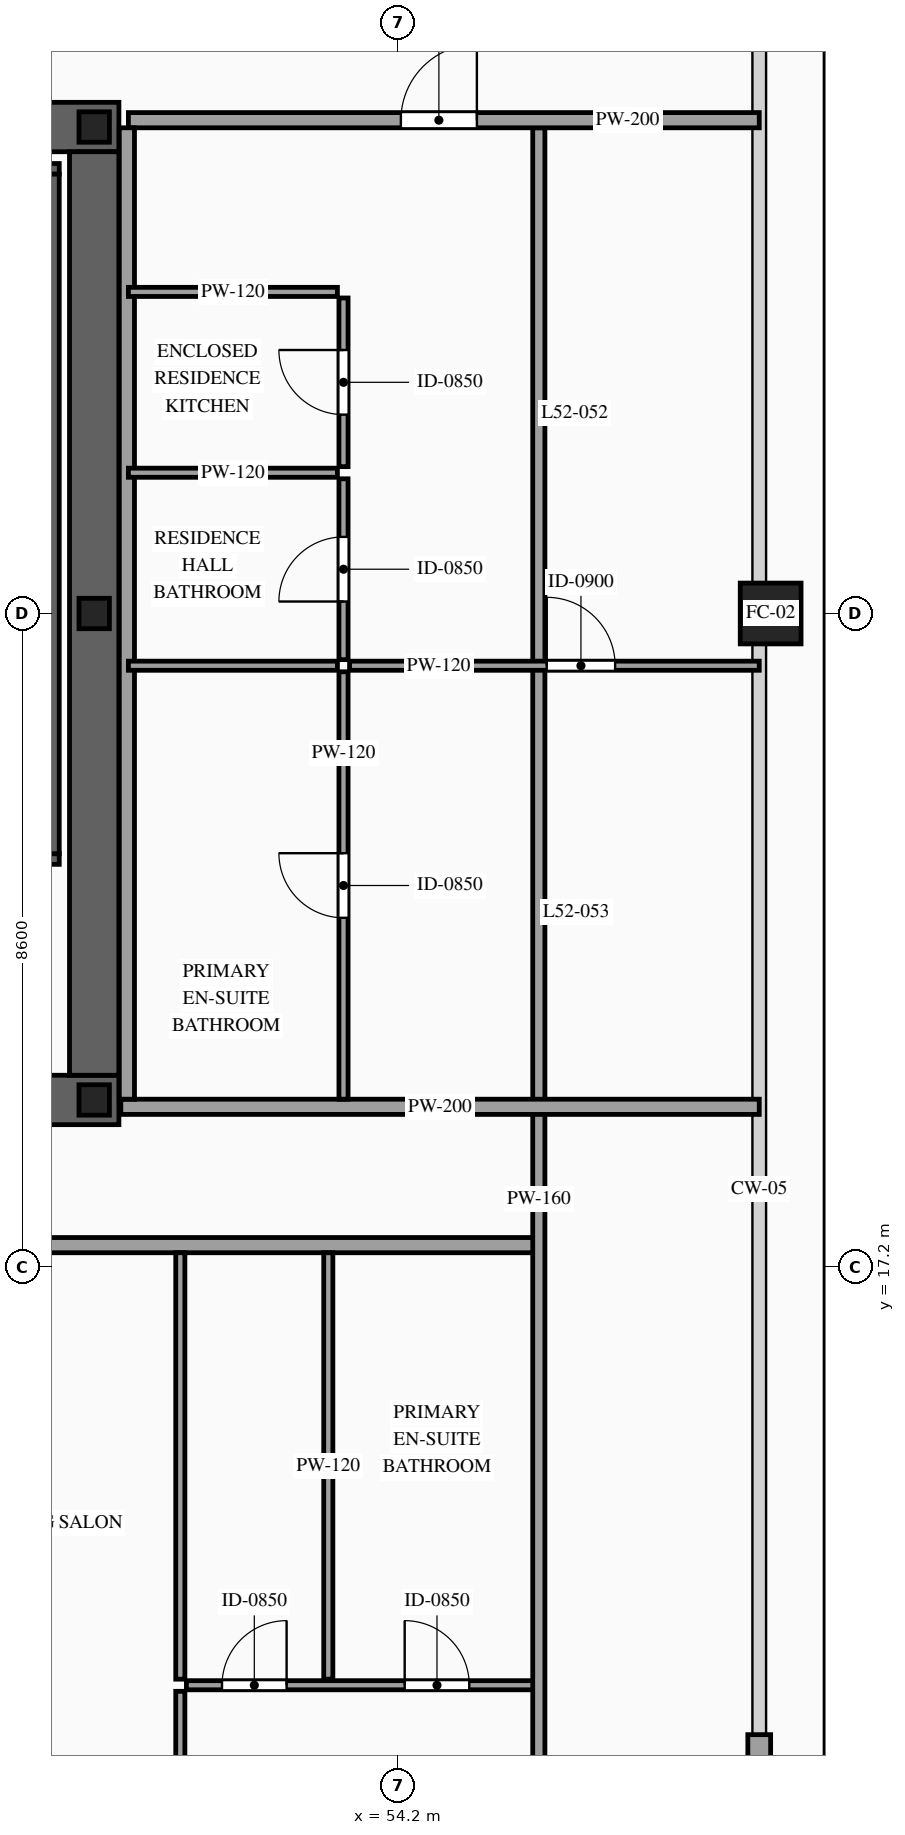
"""IFC4 building model, lengths in metres.
Left out: names, types, materials, properties, quantities, classifications, styles, units other than length and angle.
Written with IfcOpenShell. Run it as: python <this file> out.ifc"""

import sys

from ifc_helpers import new_model, si_unit, direction, frame, frame_2d, origin, origin_2d, place, context, subcontext, project, spatial, rectangle, hollow_rectangle, i_section, extrude, source, transform, mapped, element, fill, save


model = new_model("IFC4")
c1 = context("Model", 3, precision=1e-05, world=origin(), true_north=direction((0.0, 1.0)))
c2 = subcontext(c1, "Body", "Model", "MODEL_VIEW")
j1 = project(units=[si_unit("LENGTHUNIT", "METRE"), si_unit("PLANEANGLEUNIT", "RADIAN")], contexts=[c1])
p1 = place(None, origin())
s1 = spatial("IfcSite", under=j1, at=p1, CompositionType="ELEMENT")
p2 = place(p1, origin())
s2 = spatial("IfcBuilding", under=s1, at=p2, CompositionType="ELEMENT")
p3 = place(p2, frame((0.0, 0.0, 198.5)))
s3 = spatial("IfcBuildingStorey", under=s2, at=p3, CompositionType="ELEMENT", Elevation=198.5)
p4 = place(p3, frame((23.475, 19.4, 0.0), z_axis=(0.0, 0.0, 1.0), x_axis=(1.0, 0.0, 0.0)))
e1 = element("IfcWall", 1, at=p4, inside=s3, PredefinedType="SHEAR", context=c2, shape_type="SweptSolid", body=[
    extrude(rectangle(XDim=27.05, YDim=0.65, at=frame_2d((13.525, 0.0))), origin(), (0.0, 0.0, 1.0), 3.5),
])
p5 = place(p4, frame((1.975, 0.0, 0.0)))
e2 = element("IfcOpeningElement", 2, at=p5, cuts=e1, PredefinedType="OPENING", context=c2, shape_type="SweptSolid", body=[
    extrude(rectangle(XDim=1.1, YDim=2.2, at=frame_2d((0.55, 1.1))), frame((0.0, 0.34, 0.0), z_axis=(0.0, -1.0, 0.0), x_axis=(1.0, 0.0, 0.0)), (0.0, 0.0, 1.0), 0.68),
])
p6 = place(p4, frame((9.875, 0.0, 0.0)))
e3 = element("IfcOpeningElement", 3, at=p6, cuts=e1, PredefinedType="OPENING", context=c2, shape_type="SweptSolid", body=[
    extrude(rectangle(XDim=1.1, YDim=2.2, at=frame_2d((0.55, 1.1))), frame((0.0, 0.34, 0.0), z_axis=(0.0, -1.0, 0.0), x_axis=(1.0, 0.0, 0.0)), (0.0, 0.0, 1.0), 0.68),
])
p7 = place(p4, frame((23.075, 0.0, 0.0)))
e4 = element("IfcOpeningElement", 4, at=p7, cuts=e1, PredefinedType="OPENING", context=c2, shape_type="SweptSolid", body=[
    extrude(rectangle(XDim=1.1, YDim=2.2, at=frame_2d((0.55, 1.1))), frame((0.0, 0.34, 0.0), z_axis=(0.0, -1.0, 0.0), x_axis=(1.0, 0.0, 0.0)), (0.0, 0.0, 1.0), 0.68),
])
p8 = place(p4, frame((19.695, 0.0, 0.0)))
e5 = element("IfcOpeningElement", 5, at=p8, cuts=e1, PredefinedType="OPENING", context=c2, shape_type="SweptSolid", body=[
    extrude(rectangle(XDim=0.9, YDim=2.15, at=frame_2d((0.45, 1.075))), frame((0.0, 0.34, 0.0), z_axis=(0.0, -1.0, 0.0), x_axis=(1.0, 0.0, 0.0)), (0.0, 0.0, 1.0), 0.68),
])
p9 = place(p4, frame((18.255, 0.0, 0.0)))
e6 = element("IfcOpeningElement", 6, at=p9, cuts=e1, PredefinedType="OPENING", context=c2, shape_type="SweptSolid", body=[
    extrude(rectangle(XDim=0.9, YDim=2.15, at=frame_2d((0.45, 1.075))), frame((0.0, 0.34, 0.0), z_axis=(0.0, -1.0, 0.0), x_axis=(1.0, 0.0, 0.0)), (0.0, 0.0, 1.0), 0.68),
])
p10 = place(p3, frame((23.475, 32.2, 0.0), z_axis=(0.0, 0.0, 1.0), x_axis=(1.0, 0.0, 0.0)))
e7 = element("IfcWall", 7, at=p10, inside=s3, PredefinedType="SHEAR", context=c2, shape_type="SweptSolid", body=[
    extrude(rectangle(XDim=27.05, YDim=0.65, at=frame_2d((13.525, 0.0))), origin(), (0.0, 0.0, 1.0), 3.5),
])
p11 = place(p10, frame((4.595, 0.0, 0.0)))
e8 = element("IfcOpeningElement", 8, at=p11, cuts=e7, PredefinedType="OPENING", context=c2, shape_type="SweptSolid", body=[
    extrude(rectangle(XDim=0.9, YDim=2.15, at=frame_2d((0.45, 1.075))), frame((0.0, 0.34, 0.0), z_axis=(0.0, -1.0, 0.0), x_axis=(1.0, 0.0, 0.0)), (0.0, 0.0, 1.0), 0.68),
])
p12 = place(p10, frame((9.875, 0.0, 0.0)))
e9 = element("IfcOpeningElement", 9, at=p12, cuts=e7, PredefinedType="OPENING", context=c2, shape_type="SweptSolid", body=[
    extrude(rectangle(XDim=1.1, YDim=2.2, at=frame_2d((0.55, 1.1))), frame((0.0, 0.34, 0.0), z_axis=(0.0, -1.0, 0.0), x_axis=(1.0, 0.0, 0.0)), (0.0, 0.0, 1.0), 0.68),
])
p13 = place(p10, frame((15.725, 0.0, 0.0)))
e10 = element("IfcOpeningElement", 10, at=p13, cuts=e7, PredefinedType="OPENING", context=c2, shape_type="SweptSolid", body=[
    extrude(rectangle(XDim=1.1, YDim=2.2, at=frame_2d((0.55, 1.1))), frame((0.0, 0.34, 0.0), z_axis=(0.0, -1.0, 0.0), x_axis=(1.0, 0.0, 0.0)), (0.0, 0.0, 1.0), 0.68),
])
p14 = place(p10, frame((18.255, 0.0, 0.0)))
e11 = element("IfcOpeningElement", 11, at=p14, cuts=e7, PredefinedType="OPENING", context=c2, shape_type="SweptSolid", body=[
    extrude(rectangle(XDim=0.9, YDim=2.15, at=frame_2d((0.45, 1.075))), frame((0.0, 0.34, 0.0), z_axis=(0.0, -1.0, 0.0), x_axis=(1.0, 0.0, 0.0)), (0.0, 0.0, 1.0), 0.68),
])
p15 = place(p10, frame((19.695, 0.0, 0.0)))
e12 = element("IfcOpeningElement", 12, at=p15, cuts=e7, PredefinedType="OPENING", context=c2, shape_type="SweptSolid", body=[
    extrude(rectangle(XDim=0.9, YDim=2.15, at=frame_2d((0.45, 1.075))), frame((0.0, 0.34, 0.0), z_axis=(0.0, -1.0, 0.0), x_axis=(1.0, 0.0, 0.0)), (0.0, 0.0, 1.0), 0.68),
])
m1 = source(origin(), c2, "Body", "SweptSolid", [
    extrude(rectangle(XDim=12.15, YDim=0.65, at=frame_2d((6.075, 0.0))), origin(), (0.0, 0.0, 1.0), 3.5),
])
p16 = place(p3, frame((50.2, 19.725, 0.0), z_axis=(0.0, 0.0, 1.0), x_axis=(0.0, 1.0, 0.0)))
e13 = element("IfcWall", 13, at=p16, inside=s3, PredefinedType="SHEAR", context=c2, shape_type="MappedRepresentation", body=[
    mapped(m1, transform((0.0, 0.0, 0.0), scale=1.0)),
])
m2 = source(origin(), c2, "Body", "SweptSolid", [
    extrude(i_section(OverallWidth=0.4, OverallDepth=0.4, WebThickness=0.013, FlangeThickness=0.021, at=origin_2d()), origin(), (0.0, 0.0, 1.0), 3.5),
])
for number, where, z_axis, x_axis in (
    (14, (50.2, 19.4, 0.0), (0.0, 0.0, 1.0), (1.0, 0.0, 0.0)),
    (15, (50.2, 25.8, 0.0), (0.0, 0.0, 1.0), (1.0, 0.0, 0.0)),
    (16, (50.2, 32.2, 0.0), (0.0, 0.0, 1.0), (1.0, 0.0, 0.0)),
):
    element("IfcColumn", number, at=place(p3, frame(where, z_axis=z_axis, x_axis=x_axis)), inside=s3, PredefinedType="COLUMN", context=c2, shape_type="MappedRepresentation", body=[
        mapped(m2, transform((0.0, 0.0, 0.0), scale=1.0)),
    ])
m3 = source(origin(), c2, "Body", "SweptSolid", [
    extrude(hollow_rectangle(XDim=0.8, YDim=0.8, WallThickness=0.036, at=origin_2d()), origin(), (0.0, 0.0, 1.0), 3.5),
])
p17 = place(p3, frame((59.1, 25.8, 0.0), z_axis=(0.0, 0.0, 1.0), x_axis=(1.0, 0.0, 0.0)))
e17 = element("IfcColumn", 17, at=p17, inside=s3, PredefinedType="COLUMN", context=c2, shape_type="MappedRepresentation", body=[
    mapped(m3, transform((0.0, 0.0, 0.0), scale=1.0)),
])
m4 = source(origin(), c2, "Body", "SweptSolid", [
    extrude(rectangle(XDim=3.05, YDim=0.3, at=frame_2d((1.525, 0.0))), origin(), (0.0, 0.0, 1.0), 2.835),
])
p18 = place(p3, frame((58.95, 8.0, 0.0), z_axis=(0.0, 0.0, 1.0), x_axis=(0.0, 1.0, 0.0)))
e18 = element("IfcWall", 18, at=p18, inside=s3, PredefinedType="SOLIDWALL", context=c2, shape_type="MappedRepresentation", body=[
    mapped(m4, transform((0.0, 0.0, 0.0), scale=1.0)),
])
p19 = place(p3, frame((46.46, 22.57, 0.0), z_axis=(0.0, 0.0, 1.0), x_axis=(1.0, 0.0, 0.0)))
e19 = element("IfcWall", 19, at=p19, inside=s3, PredefinedType="SOLIDWALL", context=c2, shape_type="SweptSolid", body=[
    extrude(rectangle(XDim=3.28, YDim=0.14, at=frame_2d((1.64, 0.0))), origin(), (0.0, 0.0, 1.0), 3.28),
])
p20 = place(p19, frame((1.09, 0.0, 0.0)))
e20 = element("IfcOpeningElement", 20, at=p20, cuts=e19, PredefinedType="OPENING", context=c2, shape_type="SweptSolid", body=[
    extrude(rectangle(XDim=1.1, YDim=2.2, at=frame_2d((0.55, 1.1))), frame((0.0, 0.085, 0.0), z_axis=(0.0, -1.0, 0.0), x_axis=(1.0, 0.0, 0.0)), (0.0, 0.0, 1.0), 0.17),
])
m5 = source(origin(), c2, "Body", "SweptSolid", [
    extrude(rectangle(XDim=3.28, YDim=0.14, at=frame_2d((1.64, 0.0))), origin(), (0.0, 0.0, 1.0), 3.28),
])
p21 = place(p3, frame((46.46, 31.65, 0.0), z_axis=(0.0, 0.0, 1.0), x_axis=(1.0, 0.0, 0.0)))
e21 = element("IfcWall", 21, at=p21, inside=s3, PredefinedType="SOLIDWALL", context=c2, shape_type="MappedRepresentation", body=[
    mapped(m5, transform((0.0, 0.0, 0.0), scale=1.0)),
])
m6 = source(origin(), c2, "Body", "SweptSolid", [
    extrude(rectangle(XDim=8.94, YDim=0.14, at=frame_2d((4.47, 0.0))), origin(), (0.0, 0.0, 1.0), 3.28),
])
p22 = place(p3, frame((49.67, 22.64, 0.0), z_axis=(0.0, 0.0, 1.0), x_axis=(0.0, 1.0, 0.0)))
e22 = element("IfcWall", 22, at=p22, inside=s3, PredefinedType="SOLIDWALL", context=c2, shape_type="MappedRepresentation", body=[
    mapped(m6, transform((0.0, 0.0, 0.0), scale=1.0)),
])
p23 = place(p3, frame((36.318, 17.49, 0.0), z_axis=(0.0, 0.0, 1.0), x_axis=(1.0, 0.0, 0.0)))
e23 = element("IfcWall", 23, at=p23, inside=s3, PredefinedType="PARTITIONING", context=c2, shape_type="SweptSolid", body=[
    extrude(rectangle(XDim=19.742, YDim=0.2, at=frame_2d((9.871, 0.0))), origin(), (0.0, 0.0, 1.0), 3.28),
])
p24 = place(p23, frame((11.915, 0.0, 0.0)))
e24 = element("IfcOpeningElement", 24, at=p24, cuts=e23, PredefinedType="OPENING", context=c2, shape_type="SweptSolid", body=[
    extrude(rectangle(XDim=1.0, YDim=2.2, at=frame_2d((0.5, 1.1))), frame((0.0, 0.115, 0.0), z_axis=(0.0, -1.0, 0.0), x_axis=(1.0, 0.0, 0.0)), (0.0, 0.0, 1.0), 0.23),
])
m7 = source(origin(), c2, "Body", "SweptSolid", [
    extrude(rectangle(XDim=5.61, YDim=0.12, at=frame_2d((2.805, 0.0))), origin(), (0.0, 0.0, 1.0), 3.28),
])
for number, where, z_axis, x_axis in (
    (25, (53.28, 11.78, 0.0), (0.0, 0.0, 1.0), (0.0, 1.0, 0.0)),
    (26, (51.333, 11.78, 0.0), (0.0, 0.0, 1.0), (0.0, 1.0, 0.0)),
):
    element("IfcWall", number, at=place(p3, frame(where, z_axis=z_axis, x_axis=x_axis)), inside=s3, PredefinedType="PARTITIONING", context=c2, shape_type="MappedRepresentation", body=[
        mapped(m7, transform((0.0, 0.0, 0.0), scale=1.0)),
    ])
p25 = place(p3, frame((51.413, 11.7, 0.0), z_axis=(0.0, 0.0, 1.0), x_axis=(1.0, 0.0, 0.0)))
e27 = element("IfcWall", 27, at=p25, inside=s3, PredefinedType="PARTITIONING", context=c2, shape_type="SweptSolid", body=[
    extrude(rectangle(XDim=4.647, YDim=0.12, at=frame_2d((2.323, 0.0))), origin(), (0.0, 0.0, 1.0), 3.28),
])
p26 = place(p25, frame((2.872, 0.0, 0.0)))
e28 = element("IfcOpeningElement", 28, at=p26, cuts=e27, PredefinedType="OPENING", context=c2, shape_type="SweptSolid", body=[
    extrude(rectangle(XDim=0.85, YDim=2.1, at=frame_2d((0.425, 1.05))), frame((0.0, 0.075, 0.0), z_axis=(0.0, -1.0, 0.0), x_axis=(1.0, 0.0, 0.0)), (0.0, 0.0, 1.0), 0.15),
])
p27 = place(p25, frame((0.469, 0.0, 0.0)))
e29 = element("IfcOpeningElement", 29, at=p27, cuts=e27, PredefinedType="OPENING", context=c2, shape_type="SweptSolid", body=[
    extrude(rectangle(XDim=0.85, YDim=2.1, at=frame_2d((0.425, 1.05))), frame((0.0, 0.075, 0.0), z_axis=(0.0, -1.0, 0.0), x_axis=(1.0, 0.0, 0.0)), (0.0, 0.0, 1.0), 0.15),
])
p28 = place(p3, frame((51.333, 3.85, 0.0), z_axis=(0.0, 0.0, 1.0), x_axis=(0.0, 1.0, 0.0)))
e30 = element("IfcWall", 30, at=p28, inside=s3, PredefinedType="PARTITIONING", context=c2, shape_type="SweptSolid", body=[
    extrude(rectangle(XDim=7.77, YDim=0.12, at=frame_2d((3.885, 0.0))), origin(), (0.0, 0.0, 1.0), 3.28),
])
p29 = place(p28, frame((3.435, 0.0, 0.0)))
e31 = element("IfcOpeningElement", 31, at=p29, cuts=e30, PredefinedType="OPENING", context=c2, shape_type="SweptSolid", body=[
    extrude(rectangle(XDim=0.9, YDim=2.15, at=frame_2d((0.45, 1.075))), frame((0.0, 0.075, 0.0), z_axis=(0.0, -1.0, 0.0), x_axis=(1.0, 0.0, 0.0)), (0.0, 0.0, 1.0), 0.15),
])
m8 = source(origin(), c2, "Body", "SweptSolid", [
    extrude(rectangle(XDim=28.19, YDim=0.16, at=frame_2d((14.095, 0.0))), origin(), (0.0, 0.0, 1.0), 3.28),
])
p30 = place(p3, frame((56.05, 4.0, 0.0), z_axis=(0.0, 0.0, 1.0), x_axis=(0.0, 1.0, 0.0)))
e32 = element("IfcWall", 32, at=p30, inside=s3, PredefinedType="PARTITIONING", context=c2, shape_type="MappedRepresentation", body=[
    mapped(m8, transform((0.0, 0.0, 0.0), scale=1.0)),
])
p31 = place(p3, frame((50.65, 32.29, 0.0), z_axis=(0.0, 0.0, 1.0), x_axis=(1.0, 0.0, 0.0)))
e33 = element("IfcWall", 33, at=p31, inside=s3, PredefinedType="PARTITIONING", context=c2, shape_type="SweptSolid", body=[
    extrude(rectangle(XDim=8.3, YDim=0.2, at=frame_2d((4.15, 0.0))), origin(), (0.0, 0.0, 1.0), 2.775),
])
p32 = place(p31, frame((3.585, 0.0, 0.0)))
e34 = element("IfcOpeningElement", 34, at=p32, cuts=e33, PredefinedType="OPENING", context=c2, shape_type="SweptSolid", body=[
    extrude(rectangle(XDim=1.0, YDim=2.2, at=frame_2d((0.5, 1.1))), frame((0.0, 0.115, 0.0), z_axis=(0.0, -1.0, 0.0), x_axis=(1.0, 0.0, 0.0)), (0.0, 0.0, 1.0), 0.23),
])
m9 = source(origin(), c2, "Body", "SweptSolid", [
    extrude(rectangle(XDim=8.4, YDim=0.2, at=frame_2d((4.2, 0.0))), origin(), (0.0, 0.0, 1.0), 2.775),
])
p33 = place(p3, frame((50.55, 19.31, 0.0), z_axis=(0.0, 0.0, 1.0), x_axis=(1.0, 0.0, 0.0)))
e35 = element("IfcWall", 35, at=p33, inside=s3, PredefinedType="PARTITIONING", context=c2, shape_type="MappedRepresentation", body=[
    mapped(m9, transform((0.0, 0.0, 0.0), scale=1.0)),
])
m10 = source(origin(), c2, "Body", "SweptSolid", [
    extrude(rectangle(XDim=12.78, YDim=0.2, at=frame_2d((6.39, 0.0))), origin(), (0.0, 0.0, 1.0), 3.28),
])
p34 = place(p3, frame((50.63, 19.41, 0.0), z_axis=(0.0, 0.0, 1.0), x_axis=(0.0, 1.0, 0.0)))
e36 = element("IfcWall", 36, at=p34, inside=s3, PredefinedType="PARTITIONING", context=c2, shape_type="MappedRepresentation", body=[
    mapped(m10, transform((0.0, 0.0, 0.0), scale=1.0)),
])
m11 = source(origin(), c2, "Body", "SweptSolid", [
    extrude(rectangle(XDim=2.75, YDim=0.12, at=frame_2d((1.375, 0.0))), origin(), (0.0, 0.0, 1.0), 3.28),
])
for number, where, z_axis, x_axis in (
    (37, (50.65, 25.113, 0.0), (0.0, 0.0, 1.0), (1.0, 0.0, 0.0)),
    (38, (50.65, 27.652, 0.0), (0.0, 0.0, 1.0), (1.0, 0.0, 0.0)),
):
    element("IfcWall", number, at=place(p3, frame(where, z_axis=z_axis, x_axis=x_axis)), inside=s3, PredefinedType="PARTITIONING", context=c2, shape_type="MappedRepresentation", body=[
        mapped(m11, transform((0.0, 0.0, 0.0), scale=1.0)),
    ])
p35 = place(p3, frame((53.48, 25.193, 0.0), z_axis=(0.0, 0.0, 1.0), x_axis=(0.0, 1.0, 0.0)))
e39 = element("IfcWall", 39, at=p35, inside=s3, PredefinedType="PARTITIONING", context=c2, shape_type="SweptSolid", body=[
    extrude(rectangle(XDim=2.379, YDim=0.12, at=frame_2d((1.189, 0.0))), origin(), (0.0, 0.0, 1.0), 3.28),
])
p36 = place(p35, frame((0.764, 0.0, 0.0)))
e40 = element("IfcOpeningElement", 40, at=p36, cuts=e39, PredefinedType="OPENING", context=c2, shape_type="SweptSolid", body=[
    extrude(rectangle(XDim=0.85, YDim=2.1, at=frame_2d((0.425, 1.05))), frame((0.0, 0.075, 0.0), z_axis=(0.0, -1.0, 0.0), x_axis=(1.0, 0.0, 0.0)), (0.0, 0.0, 1.0), 0.15),
])
p37 = place(p3, frame((50.65, 30.031, 0.0), z_axis=(0.0, 0.0, 1.0), x_axis=(1.0, 0.0, 0.0)))
e41 = element("IfcWall", 41, at=p37, inside=s3, PredefinedType="PARTITIONING", context=c2, shape_type="MappedRepresentation", body=[
    mapped(m11, transform((0.0, 0.0, 0.0), scale=1.0)),
])
p38 = place(p3, frame((53.48, 27.732, 0.0), z_axis=(0.0, 0.0, 1.0), x_axis=(0.0, 1.0, 0.0)))
e42 = element("IfcWall", 42, at=p38, inside=s3, PredefinedType="PARTITIONING", context=c2, shape_type="SweptSolid", body=[
    extrude(rectangle(XDim=2.219, YDim=0.12, at=frame_2d((1.109, 0.0))), origin(), (0.0, 0.0, 1.0), 3.28),
])
p39 = place(p38, frame((0.685, 0.0, 0.0)))
e43 = element("IfcOpeningElement", 43, at=p39, cuts=e42, PredefinedType="OPENING", context=c2, shape_type="SweptSolid", body=[
    extrude(rectangle(XDim=0.85, YDim=2.1, at=frame_2d((0.425, 1.05))), frame((0.0, 0.075, 0.0), z_axis=(0.0, -1.0, 0.0), x_axis=(1.0, 0.0, 0.0)), (0.0, 0.0, 1.0), 0.15),
])
p40 = place(p3, frame((53.56, 25.113, 0.0), z_axis=(0.0, 0.0, 1.0), x_axis=(1.0, 0.0, 0.0)))
e44 = element("IfcWall", 44, at=p40, inside=s3, PredefinedType="PARTITIONING", context=c2, shape_type="SweptSolid", body=[
    extrude(rectangle(XDim=5.39, YDim=0.12, at=frame_2d((2.695, 0.0))), origin(), (0.0, 0.0, 1.0), 3.28),
])
p41 = place(p40, frame((2.594, 0.0, 0.0)))
e45 = element("IfcOpeningElement", 45, at=p41, cuts=e44, PredefinedType="OPENING", context=c2, shape_type="SweptSolid", body=[
    extrude(rectangle(XDim=0.9, YDim=2.15, at=frame_2d((0.45, 1.075))), frame((0.0, 0.075, 0.0), z_axis=(0.0, -1.0, 0.0), x_axis=(1.0, 0.0, 0.0)), (0.0, 0.0, 1.0), 0.15),
])
p42 = place(p3, frame((53.48, 19.41, 0.0), z_axis=(0.0, 0.0, 1.0), x_axis=(0.0, 1.0, 0.0)))
e46 = element("IfcWall", 46, at=p42, inside=s3, PredefinedType="PARTITIONING", context=c2, shape_type="SweptSolid", body=[
    extrude(rectangle(XDim=5.623, YDim=0.12, at=frame_2d((2.812, 0.0))), origin(), (0.0, 0.0, 1.0), 3.28),
])
p43 = place(p42, frame((2.386, 0.0, 0.0)))
e47 = element("IfcOpeningElement", 47, at=p43, cuts=e46, PredefinedType="OPENING", context=c2, shape_type="SweptSolid", body=[
    extrude(rectangle(XDim=0.85, YDim=2.1, at=frame_2d((0.425, 1.05))), frame((0.0, 0.075, 0.0), z_axis=(0.0, -1.0, 0.0), x_axis=(1.0, 0.0, 0.0)), (0.0, 0.0, 1.0), 0.15),
])
m12 = source(origin(), c2, "Body", "SweptSolid", [
    extrude(rectangle(XDim=0.85, YDim=2.1, at=frame_2d((0.425, 1.05))), frame((0.0, 0.025, 0.0), z_axis=(0.0, -1.0, 0.0), x_axis=(1.0, 0.0, 0.0)), (0.0, 0.0, 1.0), 0.05),
])
p44 = place(p26, origin())
e48 = element("IfcDoor", 48, at=p44, inside=s3, OperationType="SINGLE_SWING_LEFT", PredefinedType="DOOR", context=c2, shape_type="MappedRepresentation", body=[
    mapped(m12, transform((0.0, 0.0, 0.0), scale=1.0)),
])
fill(e28, e48)
p45 = place(p27, origin())
e49 = element("IfcDoor", 49, at=p45, inside=s3, OperationType="SINGLE_SWING_RIGHT", PredefinedType="DOOR", context=c2, shape_type="MappedRepresentation", body=[
    mapped(m12, transform((0.0, 0.0, 0.0), scale=1.0)),
])
fill(e29, e49)
m13 = source(origin(), c2, "Body", "SweptSolid", [
    extrude(rectangle(XDim=1.0, YDim=2.2, at=frame_2d((0.5, 1.1))), frame((0.0, 0.025, 0.0), z_axis=(0.0, -1.0, 0.0), x_axis=(1.0, 0.0, 0.0)), (0.0, 0.0, 1.0), 0.05),
])
p46 = place(p32, origin())
e50 = element("IfcDoor", 50, at=p46, inside=s3, OperationType="SINGLE_SWING_RIGHT", PredefinedType="DOOR", context=c2, shape_type="MappedRepresentation", body=[
    mapped(m13, transform((0.0, 0.0, 0.0), scale=1.0)),
])
fill(e34, e50)
p47 = place(p36, origin())
e51 = element("IfcDoor", 51, at=p47, inside=s3, OperationType="SINGLE_SWING_LEFT", PredefinedType="DOOR", context=c2, shape_type="MappedRepresentation", body=[
    mapped(m12, transform((0.0, 0.0, 0.0), scale=1.0)),
])
fill(e40, e51)
p48 = place(p39, origin())
e52 = element("IfcDoor", 52, at=p48, inside=s3, OperationType="SINGLE_SWING_RIGHT", PredefinedType="DOOR", context=c2, shape_type="MappedRepresentation", body=[
    mapped(m12, transform((0.0, 0.0, 0.0), scale=1.0)),
])
fill(e43, e52)
m14 = source(origin(), c2, "Body", "SweptSolid", [
    extrude(rectangle(XDim=0.9, YDim=2.15, at=frame_2d((0.45, 1.075))), frame((0.0, 0.025, 0.0), z_axis=(0.0, -1.0, 0.0), x_axis=(1.0, 0.0, 0.0)), (0.0, 0.0, 1.0), 0.05),
])
p49 = place(p41, origin())
e53 = element("IfcDoor", 53, at=p49, inside=s3, OperationType="SINGLE_SWING_LEFT", PredefinedType="DOOR", context=c2, shape_type="MappedRepresentation", body=[
    mapped(m14, transform((0.0, 0.0, 0.0), scale=1.0)),
])
fill(e45, e53)
p50 = place(p43, origin())
e54 = element("IfcDoor", 54, at=p50, inside=s3, OperationType="SINGLE_SWING_RIGHT", PredefinedType="DOOR", context=c2, shape_type="MappedRepresentation", body=[
    mapped(m12, transform((0.0, 0.0, 0.0), scale=1.0)),
])
fill(e47, e54)
save(model, sys.argv[1])
